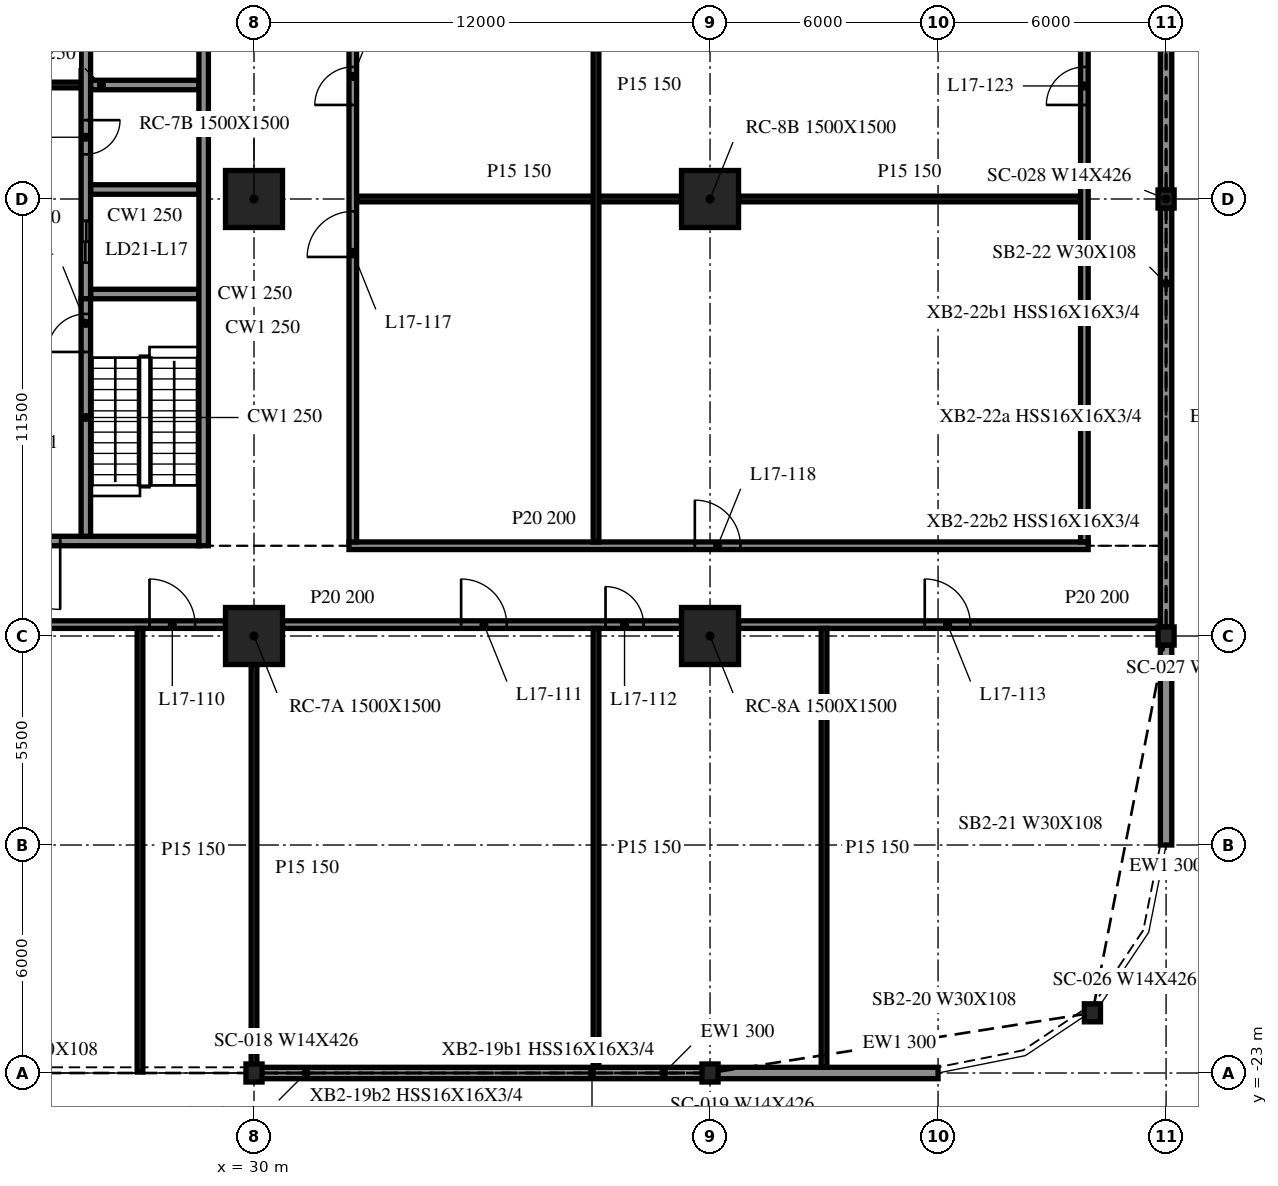
"""IFC4 building model, lengths in metres.
Left out: names, types, materials, properties, quantities, classifications, styles, units other than length and angle.
Written with IfcOpenShell. Run it as: python <this file> out.ifc"""

import sys

from ifc_helpers import new_model, si_unit, direction, frame, frame_2d, origin, origin_2d, place, context, subcontext, project, spatial, rectangle, i_section, extrude, element, fill, save


model = new_model("IFC4")
c1 = context("Model", 3, precision=1e-05, world=origin(), true_north=direction((0.0, 1.0)))
c2 = subcontext(c1, "Body", "Model", "MODEL_VIEW")
j1 = project(units=[si_unit("LENGTHUNIT", "METRE"), si_unit("PLANEANGLEUNIT", "RADIAN")], contexts=[c1])
p1 = place(None, origin())
s1 = spatial("IfcSite", under=j1, at=p1, CompositionType="ELEMENT")
p2 = place(p1, origin())
s2 = spatial("IfcBuilding", under=s1, at=p2, CompositionType="ELEMENT")
p3 = place(p2, frame((0.0, 0.0, 76.1)))
s3 = spatial("IfcBuildingStorey", under=s2, at=p3, CompositionType="ELEMENT", Elevation=76.1)
for number, where, z_axis, x_axis in (
    (1, (30.0, -11.5, -0.34), (0.0, 0.0, 1.0), (1.0, 0.0, 0.0)),
    (2, (30.0, 0.0, -0.34), (0.0, 0.0, 1.0), (1.0, 0.0, 0.0)),
    (3, (42.0, -11.5, -0.34), (0.0, 0.0, 1.0), (1.0, 0.0, 0.0)),
    (4, (42.0, 0.0, -0.34), (0.0, 0.0, 1.0), (1.0, 0.0, 0.0)),
):
    element("IfcColumn", number, at=place(p3, frame(where, z_axis=z_axis, x_axis=x_axis)), inside=s3, PredefinedType="COLUMN", context=c2, shape_type="SweptSolid", body=[
        extrude(rectangle(XDim=1.5, YDim=1.5, at=origin_2d()), origin(), (0.0, 0.0, 1.0), 4.09),
    ])
for number, where, z_axis, x_axis in (
    (5, (30.0, -23.0, -0.34), (0.0, 0.0, 1.0), (1.0, 0.0, 0.0)),
    (6, (42.0, -23.0, -0.34), (0.0, 0.0, 1.0), (1.0, 0.0, 0.0)),
    (7, (52.062, -21.416, -0.34), (0.0, 0.0, 1.0), (1.0, 0.0, 0.0)),
    (8, (54.0, -11.5, -0.34), (0.0, 0.0, 1.0), (1.0, 0.0, 0.0)),
    (9, (54.0, 0.0, -0.34), (0.0, 0.0, 1.0), (1.0, 0.0, 0.0)),
):
    element("IfcColumn", number, at=place(p3, frame(where, z_axis=z_axis, x_axis=x_axis)), inside=s3, PredefinedType="COLUMN", context=c2, shape_type="SweptSolid", body=[
        extrude(i_section(OverallWidth=0.424, OverallDepth=0.475, WebThickness=0.048, FlangeThickness=0.077, at=origin_2d()), origin(), (0.0, 0.0, 1.0), 4.09),
    ])
p4 = place(p3, frame((30.024, -23.0, 0.0), z_axis=(0.0, 0.0, 1.0), x_axis=(1.0, 0.0, 0.0)))
e10 = element("IfcWall", 10, at=p4, inside=s3, PredefinedType="NOTDEFINED", context=c2, shape_type="SweptSolid", body=[
    extrude(rectangle(XDim=11.952, YDim=0.3, at=frame_2d((5.976, 0.0))), origin(), (0.0, 0.0, 1.0), 3.75),
])
p5 = place(p3, frame((42.024, -23.0, 0.0), z_axis=(0.0, 0.0, 1.0), x_axis=(1.0, 0.0, 0.0)))
e11 = element("IfcWall", 11, at=p5, inside=s3, PredefinedType="NOTDEFINED", context=c2, shape_type="SweptSolid", body=[
    extrude(rectangle(XDim=5.976, YDim=0.3, at=frame_2d((2.988, 0.0))), origin(), (0.0, 0.0, 1.0), 3.75),
])
p6 = place(p3, frame((54.0, -17.0, 0.0), z_axis=(0.0, 0.0, 1.0), x_axis=(0.0, 1.0, 0.0)))
e12 = element("IfcWall", 12, at=p6, inside=s3, PredefinedType="NOTDEFINED", context=c2, shape_type="SweptSolid", body=[
    extrude(rectangle(XDim=5.262, YDim=0.3, at=frame_2d((2.631, 0.0))), origin(), (0.0, 0.0, 1.0), 3.75),
])
for number, where, z_axis, x_axis in (
    (13, (54.0, -11.262, 0.0), (0.0, 0.0, 1.0), (0.0, 1.0, 0.0)),
    (14, (54.0, 0.238, 0.0), (0.0, 0.0, 1.0), (0.0, 1.0, 0.0)),
):
    element("IfcWall", number, at=place(p3, frame(where, z_axis=z_axis, x_axis=x_axis)), inside=s3, PredefinedType="NOTDEFINED", context=c2, shape_type="SweptSolid", body=[
        extrude(rectangle(XDim=11.024, YDim=0.3, at=frame_2d((5.512, 0.0))), origin(), (0.0, 0.0, 1.0), 3.75),
    ])
p7 = place(p3, frame((28.675, -9.125, 0.0), z_axis=(0.0, 0.0, 1.0), x_axis=(0.0, 1.0, 0.0)))
e15 = element("IfcWall", 15, at=p7, inside=s3, PredefinedType="SOLIDWALL", context=c2, shape_type="SweptSolid", body=[
    extrude(rectangle(XDim=24.25, YDim=0.25, at=frame_2d((12.125, 0.0))), origin(), (0.0, 0.0, 1.0), 3.75),
])
p8 = place(p7, frame((13.075, 0.0, 0.0)))
e16 = element("IfcOpeningElement", 16, at=p8, cuts=e15, PredefinedType="OPENING", context=c2, shape_type="SweptSolid", body=[
    extrude(rectangle(XDim=0.9, YDim=2.1, at=frame_2d((0.45, 1.05))), frame((0.0, 0.135, 0.0), z_axis=(0.0, -1.0, 0.0), x_axis=(1.0, 0.0, 0.0)), (0.0, 0.0, 1.0), 0.27),
])
p9 = place(p7, frame((15.775, 0.0, 0.0)))
e17 = element("IfcOpeningElement", 17, at=p9, cuts=e15, PredefinedType="OPENING", context=c2, shape_type="SweptSolid", body=[
    extrude(rectangle(XDim=0.9, YDim=2.1, at=frame_2d((0.45, 1.05))), frame((0.0, 0.135, 0.0), z_axis=(0.0, -1.0, 0.0), x_axis=(1.0, 0.0, 0.0)), (0.0, 0.0, 1.0), 0.27),
])
p10 = place(p7, frame((18.975, 0.0, 0.0)))
e18 = element("IfcOpeningElement", 18, at=p10, cuts=e15, PredefinedType="OPENING", context=c2, shape_type="SweptSolid", body=[
    extrude(rectangle(XDim=0.9, YDim=2.1, at=frame_2d((0.45, 1.05))), frame((0.0, 0.135, 0.0), z_axis=(0.0, -1.0, 0.0), x_axis=(1.0, 0.0, 0.0)), (0.0, 0.0, 1.0), 0.27),
])
p11 = place(p7, frame((22.327, 0.0, 0.0)))
e19 = element("IfcOpeningElement", 19, at=p11, cuts=e15, PredefinedType="OPENING", context=c2, shape_type="SweptSolid", body=[
    extrude(rectangle(XDim=0.9, YDim=2.1, at=frame_2d((0.45, 1.05))), frame((0.0, 0.135, 0.0), z_axis=(0.0, -1.0, 0.0), x_axis=(1.0, 0.0, 0.0)), (0.0, 0.0, 1.0), 0.27),
])
p12 = place(p3, frame((28.55, -9.0, 0.0), z_axis=(0.0, 0.0, 1.0), x_axis=(-1.0, 0.0, 0.0)))
e20 = element("IfcWall", 20, at=p12, inside=s3, PredefinedType="SOLIDWALL", context=c2, shape_type="SweptSolid", body=[
    extrude(rectangle(XDim=9.1, YDim=0.25, at=frame_2d((4.55, 0.0))), origin(), (0.0, 0.0, 1.0), 3.75),
])
p13 = place(p12, frame((3.65, 0.0, 0.0)))
e21 = element("IfcOpeningElement", 21, at=p13, cuts=e20, PredefinedType="OPENING", context=c2, shape_type="SweptSolid", body=[
    extrude(rectangle(XDim=1.8, YDim=2.1, at=frame_2d((0.9, 1.05))), frame((0.0, 0.135, 0.0), z_axis=(0.0, -1.0, 0.0), x_axis=(1.0, 0.0, 0.0)), (0.0, 0.0, 1.0), 0.27),
])
p14 = place(p3, frame((25.575, -8.875, 0.0), z_axis=(0.0, 0.0, 1.0), x_axis=(0.0, 1.0, 0.0)))
e22 = element("IfcWall", 22, at=p14, inside=s3, PredefinedType="SOLIDWALL", context=c2, shape_type="SweptSolid", body=[
    extrude(rectangle(XDim=6.25, YDim=0.25, at=frame_2d((3.125, 0.0))), origin(), (0.0, 0.0, 1.0), 3.75),
])
p15 = place(p14, frame((4.85, 0.0, 0.0)))
e23 = element("IfcOpeningElement", 23, at=p15, cuts=e22, PredefinedType="OPENING", context=c2, shape_type="SweptSolid", body=[
    extrude(rectangle(XDim=1.0, YDim=2.1, at=frame_2d((0.5, 1.05))), frame((0.0, 0.135, 0.0), z_axis=(0.0, -1.0, 0.0), x_axis=(1.0, 0.0, 0.0)), (0.0, 0.0, 1.0), 0.27),
])
p16 = place(p3, frame((25.575, 14.875, 0.0), z_axis=(0.0, 0.0, 1.0), x_axis=(0.0, -1.0, 0.0)))
e24 = element("IfcWall", 24, at=p16, inside=s3, PredefinedType="SOLIDWALL", context=c2, shape_type="SweptSolid", body=[
    extrude(rectangle(XDim=17.5, YDim=0.25, at=frame_2d((8.75, 0.0))), origin(), (0.0, 0.0, 1.0), 3.75),
])
p17 = place(p16, frame((15.45, 0.0, 0.0)))
e25 = element("IfcOpeningElement", 25, at=p17, cuts=e24, PredefinedType="OPENING", context=c2, shape_type="SweptSolid", body=[
    extrude(rectangle(XDim=1.1, YDim=2.1, at=frame_2d((0.55, 1.05))), frame((0.0, 0.135, 0.0), z_axis=(0.0, -1.0, 0.0), x_axis=(1.0, 0.0, 0.0)), (0.0, 0.0, 1.0), 0.27),
])
p18 = place(p16, frame((12.8, 0.0, 0.0)))
e26 = element("IfcOpeningElement", 26, at=p18, cuts=e24, PredefinedType="OPENING", context=c2, shape_type="SweptSolid", body=[
    extrude(rectangle(XDim=0.9, YDim=2.1, at=frame_2d((0.45, 1.05))), frame((0.0, 0.135, 0.0), z_axis=(0.0, -1.0, 0.0), x_axis=(1.0, 0.0, 0.0)), (0.0, 0.0, 1.0), 0.27),
])
for number, where, z_axis, x_axis in (
    (27, (25.7, -2.5, 0.0), (0.0, 0.0, 1.0), (1.0, 0.0, 0.0)),
    (28, (25.7, 0.25, 0.0), (0.0, 0.0, 1.0), (1.0, 0.0, 0.0)),
    (29, (25.7, 3.0, 0.0), (0.0, 0.0, 1.0), (1.0, 0.0, 0.0)),
):
    element("IfcWall", number, at=place(p3, frame(where, z_axis=z_axis, x_axis=x_axis)), inside=s3, PredefinedType="SOLIDWALL", context=c2, shape_type="SweptSolid", body=[
        extrude(rectangle(XDim=2.85, YDim=0.25, at=frame_2d((1.425, 0.0))), origin(), (0.0, 0.0, 1.0), 3.75),
    ])
p19 = place(p3, frame((22.55, 3.0, 0.0), z_axis=(0.0, 0.0, 1.0), x_axis=(1.0, 0.0, 0.0)))
e30 = element("IfcWall", 30, at=p19, inside=s3, PredefinedType="PARTITIONING", context=c2, shape_type="SweptSolid", body=[
    extrude(rectangle(XDim=2.9, YDim=0.15, at=frame_2d((1.45, 0.0))), origin(), (0.0, 0.0, 1.0), 3.75),
])
p20 = place(p3, frame((18.75, -11.2, 0.0), z_axis=(0.0, 0.0, 1.0), x_axis=(1.0, 0.0, 0.0)))
e31 = element("IfcWall", 31, at=p20, inside=s3, PredefinedType="PARTITIONING", context=c2, shape_type="SweptSolid", body=[
    extrude(rectangle(XDim=10.5, YDim=0.2, at=frame_2d((5.25, 0.0))), origin(), (0.0, 0.0, 1.0), 3.75),
])
p21 = place(p20, frame((4.7, 0.0, 0.0)))
e32 = element("IfcOpeningElement", 32, at=p21, cuts=e31, PredefinedType="OPENING", context=c2, shape_type="SweptSolid", body=[
    extrude(rectangle(XDim=1.2, YDim=2.1, at=frame_2d((0.6, 1.05))), frame((0.0, 0.11, 0.0), z_axis=(0.0, -1.0, 0.0), x_axis=(1.0, 0.0, 0.0)), (0.0, 0.0, 1.0), 0.22),
])
p22 = place(p20, frame((8.5, 0.0, 0.0)))
e33 = element("IfcOpeningElement", 33, at=p22, cuts=e31, PredefinedType="OPENING", context=c2, shape_type="SweptSolid", body=[
    extrude(rectangle(XDim=1.2, YDim=2.1, at=frame_2d((0.6, 1.05))), frame((0.0, 0.11, 0.0), z_axis=(0.0, -1.0, 0.0), x_axis=(1.0, 0.0, 0.0)), (0.0, 0.0, 1.0), 0.22),
])
p23 = place(p3, frame((30.75, -11.2, 0.0), z_axis=(0.0, 0.0, 1.0), x_axis=(1.0, 0.0, 0.0)))
e34 = element("IfcWall", 34, at=p23, inside=s3, PredefinedType="PARTITIONING", context=c2, shape_type="SweptSolid", body=[
    extrude(rectangle(XDim=10.5, YDim=0.2, at=frame_2d((5.25, 0.0))), origin(), (0.0, 0.0, 1.0), 3.75),
])
p24 = place(p23, frame((4.7, 0.0, 0.0)))
e35 = element("IfcOpeningElement", 35, at=p24, cuts=e34, PredefinedType="OPENING", context=c2, shape_type="SweptSolid", body=[
    extrude(rectangle(XDim=1.2, YDim=2.1, at=frame_2d((0.6, 1.05))), frame((0.0, 0.11, 0.0), z_axis=(0.0, -1.0, 0.0), x_axis=(1.0, 0.0, 0.0)), (0.0, 0.0, 1.0), 0.22),
])
p25 = place(p23, frame((8.5, 0.0, 0.0)))
e36 = element("IfcOpeningElement", 36, at=p25, cuts=e34, PredefinedType="OPENING", context=c2, shape_type="SweptSolid", body=[
    extrude(rectangle(XDim=1.0, YDim=2.1, at=frame_2d((0.5, 1.05))), frame((0.0, 0.11, 0.0), z_axis=(0.0, -1.0, 0.0), x_axis=(1.0, 0.0, 0.0)), (0.0, 0.0, 1.0), 0.22),
])
p26 = place(p3, frame((42.75, -11.2, 0.0), z_axis=(0.0, 0.0, 1.0), x_axis=(1.0, 0.0, 0.0)))
e37 = element("IfcWall", 37, at=p26, inside=s3, PredefinedType="PARTITIONING", context=c2, shape_type="SweptSolid", body=[
    extrude(rectangle(XDim=11.1, YDim=0.2, at=frame_2d((5.55, 0.0))), origin(), (0.0, 0.0, 1.0), 3.75),
])
p27 = place(p26, frame((4.9, 0.0, 0.0)))
e38 = element("IfcOpeningElement", 38, at=p27, cuts=e37, PredefinedType="OPENING", context=c2, shape_type="SweptSolid", body=[
    extrude(rectangle(XDim=1.2, YDim=2.1, at=frame_2d((0.6, 1.05))), frame((0.0, 0.11, 0.0), z_axis=(0.0, -1.0, 0.0), x_axis=(1.0, 0.0, 0.0)), (0.0, 0.0, 1.0), 0.22),
])
p28 = place(p3, frame((32.5, -9.125, 0.0), z_axis=(0.0, 0.0, 1.0), x_axis=(1.0, 0.0, 0.0)))
e39 = element("IfcWall", 39, at=p28, inside=s3, PredefinedType="PARTITIONING", context=c2, shape_type="SweptSolid", body=[
    extrude(rectangle(XDim=19.45, YDim=0.2, at=frame_2d((9.725, 0.0))), origin(), (0.0, 0.0, 1.0), 3.75),
])
p29 = place(p28, frame((9.1, 0.0, 0.0)))
e40 = element("IfcOpeningElement", 40, at=p29, cuts=e39, PredefinedType="OPENING", context=c2, shape_type="SweptSolid", body=[
    extrude(rectangle(XDim=1.2, YDim=2.1, at=frame_2d((0.6, 1.05))), frame((0.0, 0.11, 0.0), z_axis=(0.0, -1.0, 0.0), x_axis=(1.0, 0.0, 0.0)), (0.0, 0.0, 1.0), 0.22),
])
p30 = place(p3, frame((32.7, 0.0, 0.0), z_axis=(0.0, 0.0, 1.0), x_axis=(1.0, 0.0, 0.0)))
e41 = element("IfcWall", 41, at=p30, inside=s3, PredefinedType="PARTITIONING", context=c2, shape_type="SweptSolid", body=[
    extrude(rectangle(XDim=8.55, YDim=0.15, at=frame_2d((4.275, 0.0))), origin(), (0.0, 0.0, 1.0), 3.75),
])
p31 = place(p3, frame((42.75, 0.0, 0.0), z_axis=(0.0, 0.0, 1.0), x_axis=(1.0, 0.0, 0.0)))
e42 = element("IfcWall", 42, at=p31, inside=s3, PredefinedType="PARTITIONING", context=c2, shape_type="SweptSolid", body=[
    extrude(rectangle(XDim=9.0, YDim=0.15, at=frame_2d((4.5, 0.0))), origin(), (0.0, 0.0, 1.0), 3.75),
])
p32 = place(p3, frame((27.0, -22.975, 0.0), z_axis=(0.0, 0.0, 1.0), x_axis=(0.0, 1.0, 0.0)))
e43 = element("IfcWall", 43, at=p32, inside=s3, PredefinedType="PARTITIONING", context=c2, shape_type="SweptSolid", body=[
    extrude(rectangle(XDim=11.675, YDim=0.15, at=frame_2d((5.837, 0.0))), origin(), (0.0, 0.0, 1.0), 3.75),
])
p33 = place(p3, frame((30.0, -22.975, 0.0), z_axis=(0.0, 0.0, 1.0), x_axis=(0.0, 1.0, 0.0)))
e44 = element("IfcWall", 44, at=p33, inside=s3, PredefinedType="PARTITIONING", context=c2, shape_type="SweptSolid", body=[
    extrude(rectangle(XDim=10.725, YDim=0.15, at=frame_2d((5.363, 0.0))), origin(), (0.0, 0.0, 1.0), 2.751),
])
p34 = place(p3, frame((32.6, -9.025, 0.0), z_axis=(0.0, 0.0, 1.0), x_axis=(0.0, 1.0, 0.0)))
e45 = element("IfcWall", 45, at=p34, inside=s3, PredefinedType="PARTITIONING", context=c2, shape_type="SweptSolid", body=[
    extrude(rectangle(XDim=24.05, YDim=0.2, at=frame_2d((12.025, 0.0))), origin(), (0.0, 0.0, 1.0), 3.75),
])
p35 = place(p34, frame((7.5, 0.0, 0.0)))
e46 = element("IfcOpeningElement", 46, at=p35, cuts=e45, PredefinedType="OPENING", context=c2, shape_type="SweptSolid", body=[
    extrude(rectangle(XDim=1.2, YDim=2.1, at=frame_2d((0.6, 1.05))), frame((0.0, 0.11, 0.0), z_axis=(0.0, -1.0, 0.0), x_axis=(1.0, 0.0, 0.0)), (0.0, 0.0, 1.0), 0.22),
])
p36 = place(p34, frame((11.5, 0.0, 0.0)))
e47 = element("IfcOpeningElement", 47, at=p36, cuts=e45, PredefinedType="OPENING", context=c2, shape_type="SweptSolid", body=[
    extrude(rectangle(XDim=1.0, YDim=2.1, at=frame_2d((0.5, 1.05))), frame((0.0, 0.11, 0.0), z_axis=(0.0, -1.0, 0.0), x_axis=(1.0, 0.0, 0.0)), (0.0, 0.0, 1.0), 0.22),
])
p37 = place(p3, frame((39.0, -22.85, 0.0), z_axis=(0.0, 0.0, 1.0), x_axis=(0.0, 1.0, 0.0)))
e48 = element("IfcWall", 48, at=p37, inside=s3, PredefinedType="PARTITIONING", context=c2, shape_type="SweptSolid", body=[
    extrude(rectangle(XDim=11.55, YDim=0.15, at=frame_2d((5.775, 0.0))), origin(), (0.0, 0.0, 1.0), 3.75),
])
p38 = place(p3, frame((39.0, -9.025, 0.0), z_axis=(0.0, 0.0, 1.0), x_axis=(0.0, 1.0, 0.0)))
e49 = element("IfcWall", 49, at=p38, inside=s3, PredefinedType="PARTITIONING", context=c2, shape_type="SweptSolid", body=[
    extrude(rectangle(XDim=24.05, YDim=0.15, at=frame_2d((12.025, 0.0))), origin(), (0.0, 0.0, 1.0), 3.75),
])
p39 = place(p3, frame((45.0, -22.85, 0.0), z_axis=(0.0, 0.0, 1.0), x_axis=(0.0, 1.0, 0.0)))
e50 = element("IfcWall", 50, at=p39, inside=s3, PredefinedType="PARTITIONING", context=c2, shape_type="SweptSolid", body=[
    extrude(rectangle(XDim=11.55, YDim=0.15, at=frame_2d((5.775, 0.0))), origin(), (0.0, 0.0, 1.0), 3.75),
])
p40 = place(p3, frame((51.85, -9.025, 0.0), z_axis=(0.0, 0.0, 1.0), x_axis=(0.0, 1.0, 0.0)))
e51 = element("IfcWall", 51, at=p40, inside=s3, PredefinedType="PARTITIONING", context=c2, shape_type="SweptSolid", body=[
    extrude(rectangle(XDim=24.05, YDim=0.2, at=frame_2d((12.025, 0.0))), origin(), (0.0, 0.0, 1.0), 3.75),
])
p41 = place(p40, frame((11.5, 0.0, 0.0)))
e52 = element("IfcOpeningElement", 52, at=p41, cuts=e51, PredefinedType="OPENING", context=c2, shape_type="SweptSolid", body=[
    extrude(rectangle(XDim=1.0, YDim=2.1, at=frame_2d((0.5, 1.05))), frame((0.0, 0.11, 0.0), z_axis=(0.0, -1.0, 0.0), x_axis=(1.0, 0.0, 0.0)), (0.0, 0.0, 1.0), 0.22),
])
p42 = place(p13, origin())
e53 = element("IfcDoor", 53, at=p42, inside=s3, OperationType="DOUBLE_DOOR_SINGLE_SWING", PredefinedType="DOOR", context=c2, shape_type="SweptSolid", body=[
    extrude(rectangle(XDim=1.8, YDim=2.1, at=frame_2d((0.9, 1.05))), frame((0.0, 0.025, 0.0), z_axis=(0.0, -1.0, 0.0), x_axis=(1.0, 0.0, 0.0)), (0.0, 0.0, 1.0), 0.05),
])
fill(e21, e53)
p43 = place(p17, origin())
e54 = element("IfcDoor", 54, at=p43, inside=s3, OperationType="DOUBLE_DOOR_SLIDING", PredefinedType="DOOR", context=c2, shape_type="SweptSolid", body=[
    extrude(rectangle(XDim=1.1, YDim=2.1, at=frame_2d((0.55, 1.05))), frame((0.0, 0.025, 0.0), z_axis=(0.0, -1.0, 0.0), x_axis=(1.0, 0.0, 0.0)), (0.0, 0.0, 1.0), 0.05),
])
fill(e25, e54)
p44 = place(p18, origin())
e55 = element("IfcDoor", 55, at=p44, inside=s3, OperationType="SINGLE_SWING_LEFT", PredefinedType="DOOR", context=c2, shape_type="SweptSolid", body=[
    extrude(rectangle(XDim=0.9, YDim=2.1, at=frame_2d((0.45, 1.05))), frame((0.0, 0.025, 0.0), z_axis=(0.0, -1.0, 0.0), x_axis=(1.0, 0.0, 0.0)), (0.0, 0.0, 1.0), 0.05),
])
fill(e26, e55)
p45 = place(p15, origin())
e56 = element("IfcDoor", 56, at=p45, inside=s3, OperationType="SINGLE_SWING_LEFT", PredefinedType="DOOR", context=c2, shape_type="SweptSolid", body=[
    extrude(rectangle(XDim=1.0, YDim=2.1, at=frame_2d((0.5, 1.05))), frame((0.0, 0.025, 0.0), z_axis=(0.0, -1.0, 0.0), x_axis=(1.0, 0.0, 0.0)), (0.0, 0.0, 1.0), 0.05),
])
fill(e23, e56)
p46 = place(p22, origin())
e57 = element("IfcDoor", 57, at=p46, inside=s3, OperationType="SINGLE_SWING_LEFT", PredefinedType="DOOR", context=c2, shape_type="SweptSolid", body=[
    extrude(rectangle(XDim=1.2, YDim=2.1, at=frame_2d((0.6, 1.05))), frame((0.0, 0.025, 0.0), z_axis=(0.0, -1.0, 0.0), x_axis=(1.0, 0.0, 0.0)), (0.0, 0.0, 1.0), 0.05),
])
fill(e33, e57)
p47 = place(p24, origin())
e58 = element("IfcDoor", 58, at=p47, inside=s3, OperationType="SINGLE_SWING_LEFT", PredefinedType="DOOR", context=c2, shape_type="SweptSolid", body=[
    extrude(rectangle(XDim=1.2, YDim=2.1, at=frame_2d((0.6, 1.05))), frame((0.0, 0.025, 0.0), z_axis=(0.0, -1.0, 0.0), x_axis=(1.0, 0.0, 0.0)), (0.0, 0.0, 1.0), 0.05),
])
fill(e35, e58)
p48 = place(p25, origin())
e59 = element("IfcDoor", 59, at=p48, inside=s3, OperationType="SINGLE_SWING_LEFT", PredefinedType="DOOR", context=c2, shape_type="SweptSolid", body=[
    extrude(rectangle(XDim=1.0, YDim=2.1, at=frame_2d((0.5, 1.05))), frame((0.0, 0.025, 0.0), z_axis=(0.0, -1.0, 0.0), x_axis=(1.0, 0.0, 0.0)), (0.0, 0.0, 1.0), 0.05),
])
fill(e36, e59)
p49 = place(p27, origin())
e60 = element("IfcDoor", 60, at=p49, inside=s3, OperationType="SINGLE_SWING_RIGHT", PredefinedType="DOOR", context=c2, shape_type="SweptSolid", body=[
    extrude(rectangle(XDim=1.2, YDim=2.1, at=frame_2d((0.6, 1.05))), frame((0.0, 0.025, 0.0), z_axis=(0.0, -1.0, 0.0), x_axis=(1.0, 0.0, 0.0)), (0.0, 0.0, 1.0), 0.05),
])
fill(e38, e60)
p50 = place(p35, origin())
e61 = element("IfcDoor", 61, at=p50, inside=s3, OperationType="SINGLE_SWING_RIGHT", PredefinedType="DOOR", context=c2, shape_type="SweptSolid", body=[
    extrude(rectangle(XDim=1.2, YDim=2.1, at=frame_2d((0.6, 1.05))), frame((0.0, 0.025, 0.0), z_axis=(0.0, -1.0, 0.0), x_axis=(1.0, 0.0, 0.0)), (0.0, 0.0, 1.0), 0.05),
])
fill(e46, e61)
p51 = place(p29, origin())
e62 = element("IfcDoor", 62, at=p51, inside=s3, OperationType="SINGLE_SWING_LEFT", PredefinedType="DOOR", context=c2, shape_type="SweptSolid", body=[
    extrude(rectangle(XDim=1.2, YDim=2.1, at=frame_2d((0.6, 1.05))), frame((0.0, 0.025, 0.0), z_axis=(0.0, -1.0, 0.0), x_axis=(1.0, 0.0, 0.0)), (0.0, 0.0, 1.0), 0.05),
])
fill(e40, e62)
p52 = place(p36, origin())
e63 = element("IfcDoor", 63, at=p52, inside=s3, OperationType="SINGLE_SWING_RIGHT", PredefinedType="DOOR", context=c2, shape_type="SweptSolid", body=[
    extrude(rectangle(XDim=1.0, YDim=2.1, at=frame_2d((0.5, 1.05))), frame((0.0, 0.025, 0.0), z_axis=(0.0, -1.0, 0.0), x_axis=(1.0, 0.0, 0.0)), (0.0, 0.0, 1.0), 0.05),
])
fill(e47, e63)
p53 = place(p41, origin())
e64 = element("IfcDoor", 64, at=p53, inside=s3, OperationType="SINGLE_SWING_LEFT", PredefinedType="DOOR", context=c2, shape_type="SweptSolid", body=[
    extrude(rectangle(XDim=1.0, YDim=2.1, at=frame_2d((0.5, 1.05))), frame((0.0, 0.025, 0.0), z_axis=(0.0, -1.0, 0.0), x_axis=(1.0, 0.0, 0.0)), (0.0, 0.0, 1.0), 0.05),
])
fill(e52, e64)
save(model, sys.argv[1])
